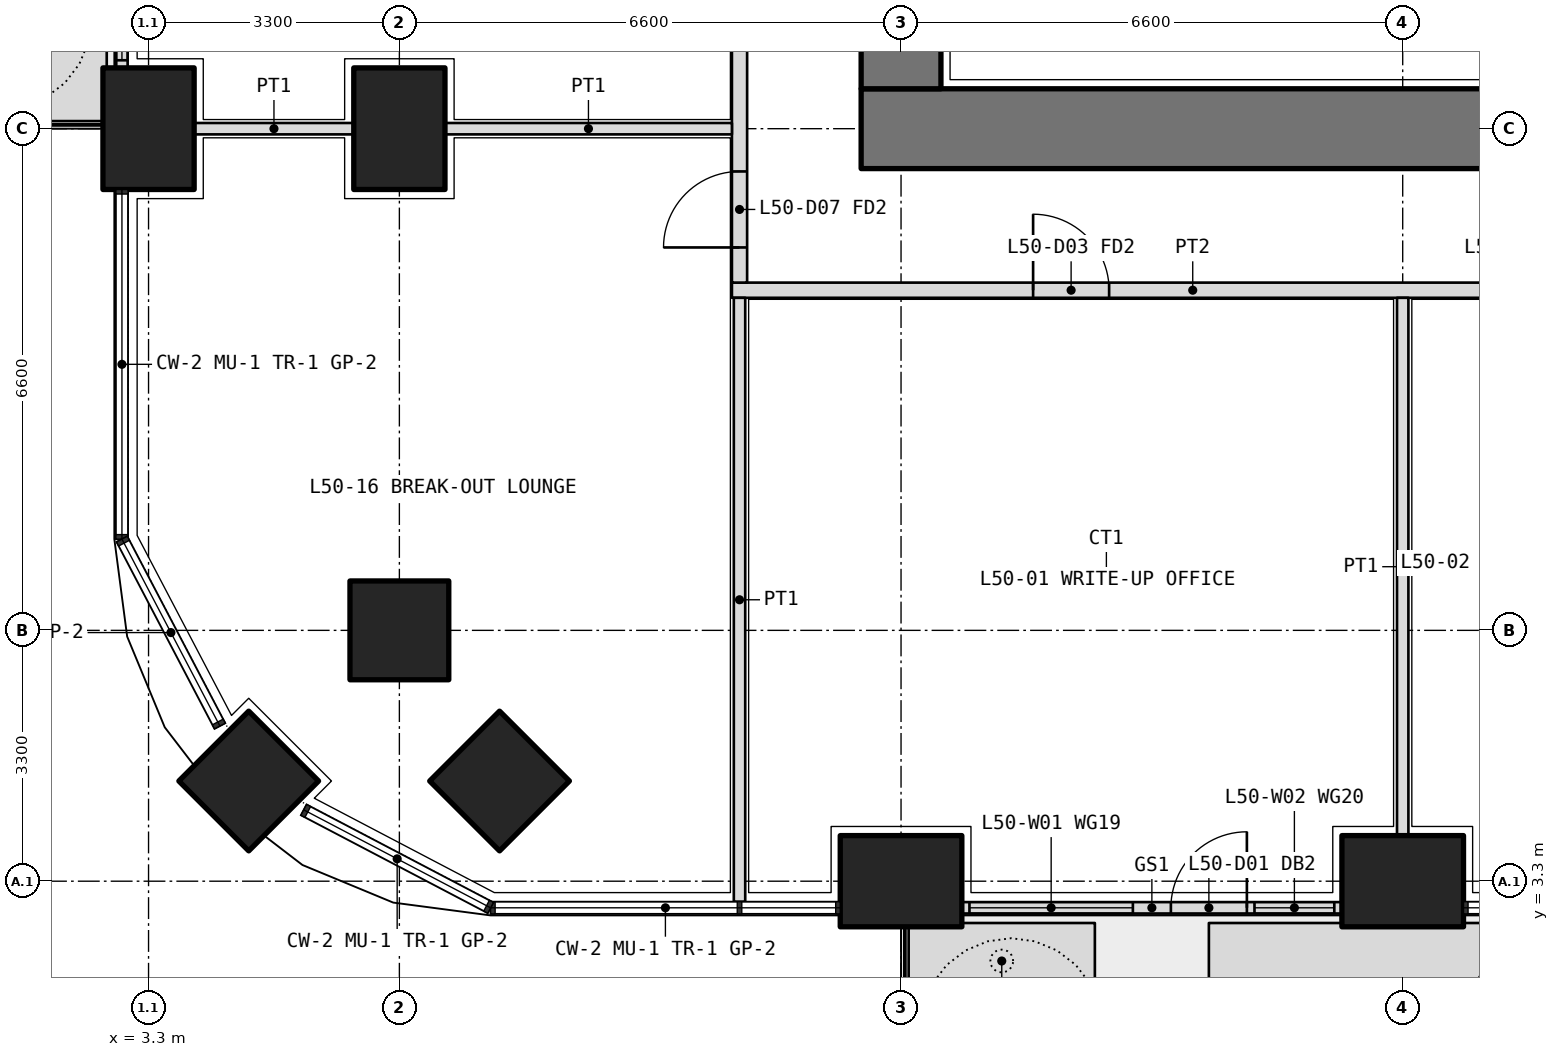
"""IFC4 building model, lengths in metres.
Left out: names, types, materials, properties, quantities, classifications, styles, units other than length and angle.
Written with IfcOpenShell. Run it as: python <this file> out.ifc"""

import sys

from ifc_helpers import new_model, si_unit, direction, frame, frame_2d, origin, origin_2d, place, context, subcontext, project, spatial, polyline, rectangle, outline, extrude, element, fill, save


model = new_model("IFC4")
c1 = context("Model", 3, precision=1e-05, world=origin(), true_north=direction((0.0, 1.0)))
c2 = subcontext(c1, "Body", "Model", "MODEL_VIEW")
j1 = project(units=[si_unit("LENGTHUNIT", "METRE"), si_unit("PLANEANGLEUNIT", "RADIAN")], contexts=[c1])
p1 = place(None, origin())
s1 = spatial("IfcSite", under=j1, at=p1, CompositionType="ELEMENT")
p2 = place(p1, origin())
s2 = spatial("IfcBuilding", under=s1, at=p2, CompositionType="ELEMENT")
p3 = place(p2, frame((0.0, 0.0, 218.7)))
s3 = spatial("IfcBuildingStorey", under=s2, at=p3, CompositionType="ELEMENT", Elevation=218.7)
p4 = place(p3, frame((4.618, 4.618, 0.0), z_axis=(0.0, 0.0, 1.0), x_axis=(0.707106781187, 0.707106781187, 0.0)))
e1 = element("IfcColumn", 1, at=p4, inside=s3, PredefinedType="COLUMN", context=c2, shape_type="SweptSolid", body=[
    extrude(rectangle(XDim=1.3, YDim=1.3, at=origin_2d()), origin(), (0.0, 0.0, 1.0), 4.2),
])
for number, where, z_axis, x_axis in (
    (2, (13.2, 3.3, 0.0), (0.0, 0.0, 1.0), (1.0, 0.0, 0.0)),
    (3, (19.8, 3.3, 0.0), (0.0, 0.0, 1.0), (1.0, 0.0, 0.0)),
    (4, (3.3, 13.2, 0.0), (0.0, 0.0, 1.0), (0.0, 1.0, 0.0)),
):
    element("IfcColumn", number, at=place(p3, frame(where, z_axis=z_axis, x_axis=x_axis)), inside=s3, PredefinedType="COLUMN", context=c2, shape_type="SweptSolid", body=[
        extrude(rectangle(XDim=1.6, YDim=1.2, at=origin_2d()), origin(), (0.0, 0.0, 1.0), 4.2),
    ])
for number, where, z_axis, x_axis in (
    (5, (6.6, 6.6, 0.0), (0.0, 0.0, 1.0), (1.0, 0.0, 0.0)),
    (6, (7.918, 4.618, 0.0), (0.0, 0.0, 1.0), (0.707, 0.707, 0.0)),
):
    element("IfcColumn", number, at=place(p3, frame(where, z_axis=z_axis, x_axis=x_axis)), inside=s3, PredefinedType="COLUMN", context=c2, shape_type="SweptSolid", body=[
        extrude(rectangle(XDim=1.3, YDim=1.3, at=origin_2d()), origin(), (0.0, 0.0, 1.0), 4.2),
    ])
p5 = place(p3, frame((6.6, 13.2, 0.0), z_axis=(0.0, 0.0, 1.0), x_axis=(0.0, 1.0, 0.0)))
e7 = element("IfcColumn", 7, at=p5, inside=s3, PredefinedType="COLUMN", context=c2, shape_type="SweptSolid", body=[
    extrude(rectangle(XDim=1.6, YDim=1.2, at=origin_2d()), origin(), (0.0, 0.0, 1.0), 4.2),
])
p6 = place(p3, origin())
e8 = element("IfcWall", 8, at=p6, inside=s3, PredefinedType="USERDEFINED", context=c2, shape_type="SweptSolid", body=[
    extrude(outline(polyline([(13.3, 1.75), (15.75, 1.75), (15.75, 2.75), (13.3, 2.75), (13.3, 1.75)]), holes=[polyline([(13.45, 1.9), (15.6, 1.9), (15.6, 2.6), (13.45, 2.6), (13.45, 1.9)])]), origin(), (0.0, 0.0, 1.0), 1.05),
])
p7 = place(p3, origin())
e9 = element("IfcWall", 9, at=p7, inside=s3, PredefinedType="USERDEFINED", context=c2, shape_type="SweptSolid", body=[
    extrude(outline(polyline([(17.25, 1.75), (26.3, 1.75), (26.3, 2.75), (17.25, 2.75), (17.25, 1.75)]), holes=[polyline([(17.4, 1.9), (26.15, 1.9), (26.15, 2.6), (17.4, 2.6), (17.4, 1.9)])]), origin(), (0.0, 0.0, 1.0), 1.05),
])
p8 = place(p3, origin())
e10 = element("IfcWall", 10, at=p8, inside=s3, PredefinedType="USERDEFINED", context=c2, shape_type="SweptSolid", body=[
    extrude(outline(polyline([(1.75, 13.3), (2.75, 13.3), (2.75, 15.75), (1.75, 15.75), (1.75, 13.3)]), holes=[polyline([(1.9, 13.45), (2.6, 13.45), (2.6, 15.6), (1.9, 15.6), (1.9, 13.45)])]), origin(), (0.0, 0.0, 1.0), 1.05),
])
p9 = place(p3, frame((14.0, 2.95, 0.0), z_axis=(0.0, 0.0, 1.0), x_axis=(1.0, 0.0, 0.0)))
e11 = element("IfcWall", 11, at=p9, inside=s3, PredefinedType="SOLIDWALL", context=c2, shape_type="SweptSolid", body=[
    extrude(rectangle(XDim=5.0, YDim=0.15, at=frame_2d((2.5, 0.0))), origin(), (0.0, 0.0, 1.0), 2.05),
])
p10 = place(p9, frame((2.75, 0.0, 0.0)))
e12 = element("IfcOpeningElement", 12, at=p10, cuts=e11, PredefinedType="OPENING", context=c2, shape_type="SweptSolid", body=[
    extrude(rectangle(XDim=1.0, YDim=2.0, at=frame_2d((0.5, 1.0))), frame((0.0, 0.085, 0.0), z_axis=(0.0, -1.0, 0.0), x_axis=(1.0, 0.0, 0.0)), (0.0, 0.0, 1.0), 0.17),
])
p11 = place(p9, frame((0.1, 0.0, 0.1)))
e13 = element("IfcOpeningElement", 13, at=p11, cuts=e11, PredefinedType="OPENING", context=c2, shape_type="SweptSolid", body=[
    extrude(rectangle(XDim=2.15, YDim=1.65, at=frame_2d((1.075, 0.825))), frame((0.0, 0.085, 0.0), z_axis=(0.0, -1.0, 0.0), x_axis=(1.0, 0.0, 0.0)), (0.0, 0.0, 1.0), 0.17),
])
p12 = place(p9, frame((3.85, 0.0, 0.1)))
e14 = element("IfcOpeningElement", 14, at=p12, cuts=e11, PredefinedType="OPENING", context=c2, shape_type="SweptSolid", body=[
    extrude(rectangle(XDim=1.05, YDim=1.65, at=frame_2d((0.525, 0.825))), frame((0.0, 0.085, 0.0), z_axis=(0.0, -1.0, 0.0), x_axis=(1.0, 0.0, 0.0)), (0.0, 0.0, 1.0), 0.17),
])
p13 = place(p3, frame((2.95, 19.0, 0.0), z_axis=(0.0, 0.0, 1.0), x_axis=(0.0, -1.0, 0.0)))
e15 = element("IfcWall", 15, at=p13, inside=s3, PredefinedType="SOLIDWALL", context=c2, shape_type="SweptSolid", body=[
    extrude(rectangle(XDim=5.0, YDim=0.15, at=frame_2d((2.5, 0.0))), origin(), (0.0, 0.0, 1.0), 2.05),
])
p14 = place(p13, frame((1.25, 0.0, 0.0)))
e16 = element("IfcOpeningElement", 16, at=p14, cuts=e15, PredefinedType="OPENING", context=c2, shape_type="SweptSolid", body=[
    extrude(rectangle(XDim=1.0, YDim=2.0, at=frame_2d((0.5, 1.0))), frame((0.0, 0.085, 0.0), z_axis=(0.0, -1.0, 0.0), x_axis=(1.0, 0.0, 0.0)), (0.0, 0.0, 1.0), 0.17),
])
p15 = place(p13, frame((0.1, 0.0, 0.1)))
e17 = element("IfcOpeningElement", 17, at=p15, cuts=e15, PredefinedType="OPENING", context=c2, shape_type="SweptSolid", body=[
    extrude(rectangle(XDim=1.05, YDim=1.65, at=frame_2d((0.525, 0.825))), frame((0.0, 0.085, 0.0), z_axis=(0.0, -1.0, 0.0), x_axis=(1.0, 0.0, 0.0)), (0.0, 0.0, 1.0), 0.17),
])
p16 = place(p13, frame((2.75, 0.0, 0.1)))
e18 = element("IfcOpeningElement", 18, at=p16, cuts=e15, PredefinedType="OPENING", context=c2, shape_type="SweptSolid", body=[
    extrude(rectangle(XDim=2.15, YDim=1.65, at=frame_2d((1.075, 0.825))), frame((0.0, 0.085, 0.0), z_axis=(0.0, -1.0, 0.0), x_axis=(1.0, 0.0, 0.0)), (0.0, 0.0, 1.0), 0.17),
])
p17 = place(p3, frame((12.675, 13.2, 0.0), z_axis=(0.0, 0.0, 1.0), x_axis=(1.0, 0.0, 0.0)))
e19 = element("IfcWall", 19, at=p17, inside=s3, PredefinedType="SHEAR", context=c2, shape_type="SweptSolid", body=[
    extrude(rectangle(XDim=27.45, YDim=1.05, at=frame_2d((13.725, 0.0))), origin(), (0.0, 0.0, 1.0), 4.2),
])
p18 = place(p3, frame((13.2, 32.475, 0.0), z_axis=(0.0, 0.0, 1.0), x_axis=(0.0, -1.0, 0.0)))
e20 = element("IfcWall", 20, at=p18, inside=s3, PredefinedType="SHEAR", context=c2, shape_type="SweptSolid", body=[
    extrude(rectangle(XDim=18.75, YDim=1.05, at=frame_2d((9.375, 0.0))), origin(), (0.0, 0.0, 1.0), 4.2),
])
p19 = place(p18, frame((14.125, 0.0, 0.0)))
e21 = element("IfcOpeningElement", 21, at=p19, cuts=e20, PredefinedType="OPENING", context=c2, shape_type="SweptSolid", body=[
    extrude(rectangle(XDim=1.6, YDim=2.1, at=frame_2d((0.8, 1.05))), frame((0.0, 0.535, 0.0), z_axis=(0.0, -1.0, 0.0), x_axis=(1.0, 0.0, 0.0)), (0.0, 0.0, 1.0), 1.07),
])
p20 = place(p18, frame((3.325, 0.0, 0.0)))
e22 = element("IfcOpeningElement", 22, at=p20, cuts=e20, PredefinedType="OPENING", context=c2, shape_type="SweptSolid", body=[
    extrude(rectangle(XDim=1.6, YDim=2.1, at=frame_2d((0.8, 1.05))), frame((0.0, 0.535, 0.0), z_axis=(0.0, -1.0, 0.0), x_axis=(1.0, 0.0, 0.0)), (0.0, 0.0, 1.0), 1.07),
])
p21 = place(p3, frame((10.975, 11.075, 0.0), z_axis=(0.0, 0.0, 1.0), x_axis=(1.0, 0.0, 0.0)))
e23 = element("IfcWall", 23, at=p21, inside=s3, PredefinedType="PARTITIONING", context=c2, shape_type="SweptSolid", body=[
    extrude(rectangle(XDim=12.125, YDim=0.2, at=frame_2d((6.062, 0.0))), origin(), (0.0, 0.0, 1.0), 2.55),
])
p22 = place(p21, frame((3.962, 0.0, 0.0)))
e24 = element("IfcOpeningElement", 24, at=p22, cuts=e23, PredefinedType="OPENING", context=c2, shape_type="SweptSolid", body=[
    extrude(rectangle(XDim=1.0, YDim=2.1, at=frame_2d((0.5, 1.05))), frame((0.0, 0.11, 0.0), z_axis=(0.0, -1.0, 0.0), x_axis=(1.0, 0.0, 0.0)), (0.0, 0.0, 1.0), 0.22),
])
p23 = place(p21, frame((9.975, 0.0, 0.0)))
e25 = element("IfcOpeningElement", 25, at=p23, cuts=e23, PredefinedType="OPENING", context=c2, shape_type="SweptSolid", body=[
    extrude(rectangle(XDim=1.0, YDim=2.1, at=frame_2d((0.5, 1.05))), frame((0.0, 0.11, 0.0), z_axis=(0.0, -1.0, 0.0), x_axis=(1.0, 0.0, 0.0)), (0.0, 0.0, 1.0), 0.22),
])
p24 = place(p3, frame((11.075, 11.175, 0.0), z_axis=(0.0, 0.0, 1.0), x_axis=(0.0, 1.0, 0.0)))
e26 = element("IfcWall", 26, at=p24, inside=s3, PredefinedType="PARTITIONING", context=c2, shape_type="SweptSolid", body=[
    extrude(rectangle(XDim=23.85, YDim=0.2, at=frame_2d((11.925, 0.0))), origin(), (0.0, 0.0, 1.0), 2.55),
])
p25 = place(p24, frame((0.462, 0.0, 0.0)))
e27 = element("IfcOpeningElement", 27, at=p25, cuts=e26, PredefinedType="OPENING", context=c2, shape_type="SweptSolid", body=[
    extrude(rectangle(XDim=1.0, YDim=2.1, at=frame_2d((0.5, 1.05))), frame((0.0, 0.11, 0.0), z_axis=(0.0, -1.0, 0.0), x_axis=(1.0, 0.0, 0.0)), (0.0, 0.0, 1.0), 0.22),
])
p26 = place(p24, frame((3.125, 0.0, 0.0)))
e28 = element("IfcOpeningElement", 28, at=p26, cuts=e26, PredefinedType="OPENING", context=c2, shape_type="SweptSolid", body=[
    extrude(rectangle(XDim=1.0, YDim=2.1, at=frame_2d((0.5, 1.05))), frame((0.0, 0.11, 0.0), z_axis=(0.0, -1.0, 0.0), x_axis=(1.0, 0.0, 0.0)), (0.0, 0.0, 1.0), 0.22),
])
p27 = place(p24, frame((6.475, 0.0, 0.0)))
e29 = element("IfcOpeningElement", 29, at=p27, cuts=e26, PredefinedType="OPENING", context=c2, shape_type="SweptSolid", body=[
    extrude(rectangle(XDim=0.9, YDim=2.1, at=frame_2d((0.45, 1.05))), frame((0.0, 0.11, 0.0), z_axis=(0.0, -1.0, 0.0), x_axis=(1.0, 0.0, 0.0)), (0.0, 0.0, 1.0), 0.22),
])
p28 = place(p24, frame((9.675, 0.0, 0.0)))
e30 = element("IfcOpeningElement", 30, at=p28, cuts=e26, PredefinedType="OPENING", context=c2, shape_type="SweptSolid", body=[
    extrude(rectangle(XDim=0.9, YDim=2.1, at=frame_2d((0.45, 1.05))), frame((0.0, 0.11, 0.0), z_axis=(0.0, -1.0, 0.0), x_axis=(1.0, 0.0, 0.0)), (0.0, 0.0, 1.0), 0.22),
])
p29 = place(p24, frame((12.925, 0.0, 0.0)))
e31 = element("IfcOpeningElement", 31, at=p29, cuts=e26, PredefinedType="OPENING", context=c2, shape_type="SweptSolid", body=[
    extrude(rectangle(XDim=1.0, YDim=2.1, at=frame_2d((0.5, 1.05))), frame((0.0, 0.11, 0.0), z_axis=(0.0, -1.0, 0.0), x_axis=(1.0, 0.0, 0.0)), (0.0, 0.0, 1.0), 0.22),
])
p30 = place(p24, frame((19.087, 0.0, 0.0)))
e32 = element("IfcOpeningElement", 32, at=p30, cuts=e26, PredefinedType="OPENING", context=c2, shape_type="SweptSolid", body=[
    extrude(rectangle(XDim=1.0, YDim=2.1, at=frame_2d((0.5, 1.05))), frame((0.0, 0.11, 0.0), z_axis=(0.0, -1.0, 0.0), x_axis=(1.0, 0.0, 0.0)), (0.0, 0.0, 1.0), 0.22),
])
p31 = place(p3, frame((11.075, 3.03, 0.0), z_axis=(0.0, 0.0, 1.0), x_axis=(0.0, 1.0, 0.0)))
e33 = element("IfcWall", 33, at=p31, inside=s3, PredefinedType="PARTITIONING", context=c2, shape_type="SweptSolid", body=[
    extrude(rectangle(XDim=7.945, YDim=0.15, at=frame_2d((3.973, 0.0))), origin(), (0.0, 0.0, 1.0), 3.85),
])
p32 = place(p3, frame((19.8, 3.9, 0.0), z_axis=(0.0, 0.0, 1.0), x_axis=(0.0, 1.0, 0.0)))
e34 = element("IfcWall", 34, at=p32, inside=s3, PredefinedType="PARTITIONING", context=c2, shape_type="SweptSolid", body=[
    extrude(rectangle(XDim=7.075, YDim=0.15, at=frame_2d((3.538, 0.0))), origin(), (0.0, 0.0, 1.0), 2.55),
])
p33 = place(p3, frame((3.9, 13.2, 0.0), z_axis=(0.0, 0.0, 1.0), x_axis=(1.0, 0.0, 0.0)))
e35 = element("IfcWall", 35, at=p33, inside=s3, PredefinedType="PARTITIONING", context=c2, shape_type="SweptSolid", body=[
    extrude(rectangle(XDim=2.1, YDim=0.15, at=frame_2d((1.05, 0.0))), origin(), (0.0, 0.0, 1.0), 2.55),
])
p34 = place(p3, frame((7.2, 13.2, 0.0), z_axis=(0.0, 0.0, 1.0), x_axis=(1.0, 0.0, 0.0)))
e36 = element("IfcWall", 36, at=p34, inside=s3, PredefinedType="PARTITIONING", context=c2, shape_type="SweptSolid", body=[
    extrude(rectangle(XDim=3.775, YDim=0.15, at=frame_2d((1.888, 0.0))), origin(), (0.0, 0.0, 1.0), 2.55),
])
p35 = place(p10, origin())
e37 = element("IfcDoor", 37, at=p35, inside=s3, OperationType="SINGLE_SWING_RIGHT", PredefinedType="DOOR", context=c2, shape_type="SweptSolid", body=[
    extrude(rectangle(XDim=1.0, YDim=2.0, at=frame_2d((0.5, 1.0))), frame((0.0, 0.025, 0.0), z_axis=(0.0, -1.0, 0.0), x_axis=(1.0, 0.0, 0.0)), (0.0, 0.0, 1.0), 0.05),
])
fill(e12, e37)
p36 = place(p11, origin())
e38 = element("IfcWindow", 38, at=p36, inside=s3, PartitioningType="SINGLE_PANEL", PredefinedType="WINDOW", context=c2, shape_type="SweptSolid", body=[
    extrude(rectangle(XDim=2.15, YDim=1.65, at=frame_2d((1.075, 0.825))), frame((0.0, 0.03, 0.0), z_axis=(0.0, -1.0, 0.0), x_axis=(1.0, 0.0, 0.0)), (0.0, 0.0, 1.0), 0.06),
])
fill(e13, e38)
p37 = place(p12, origin())
e39 = element("IfcWindow", 39, at=p37, inside=s3, PartitioningType="SINGLE_PANEL", PredefinedType="WINDOW", context=c2, shape_type="SweptSolid", body=[
    extrude(rectangle(XDim=1.05, YDim=1.65, at=frame_2d((0.525, 0.825))), frame((0.0, 0.03, 0.0), z_axis=(0.0, -1.0, 0.0), x_axis=(1.0, 0.0, 0.0)), (0.0, 0.0, 1.0), 0.06),
])
fill(e14, e39)
p38 = place(p16, origin())
e40 = element("IfcWindow", 40, at=p38, inside=s3, PartitioningType="SINGLE_PANEL", PredefinedType="WINDOW", context=c2, shape_type="SweptSolid", body=[
    extrude(rectangle(XDim=2.15, YDim=1.65, at=frame_2d((1.075, 0.825))), frame((0.0, 0.03, 0.0), z_axis=(0.0, -1.0, 0.0), x_axis=(1.0, 0.0, 0.0)), (0.0, 0.0, 1.0), 0.06),
])
fill(e18, e40)
p39 = place(p22, origin())
e41 = element("IfcDoor", 41, at=p39, inside=s3, OperationType="SINGLE_SWING_LEFT", PredefinedType="DOOR", context=c2, shape_type="SweptSolid", body=[
    extrude(rectangle(XDim=1.0, YDim=2.1, at=frame_2d((0.5, 1.05))), frame((0.0, 0.025, 0.0), z_axis=(0.0, -1.0, 0.0), x_axis=(1.0, 0.0, 0.0)), (0.0, 0.0, 1.0), 0.05),
])
fill(e24, e41)
p40 = place(p25, origin())
e42 = element("IfcDoor", 42, at=p40, inside=s3, OperationType="SINGLE_SWING_LEFT", PredefinedType="DOOR", context=c2, shape_type="SweptSolid", body=[
    extrude(rectangle(XDim=1.0, YDim=2.1, at=frame_2d((0.5, 1.05))), frame((0.0, 0.025, 0.0), z_axis=(0.0, -1.0, 0.0), x_axis=(1.0, 0.0, 0.0)), (0.0, 0.0, 1.0), 0.05),
])
fill(e27, e42)
save(model, sys.argv[1])
